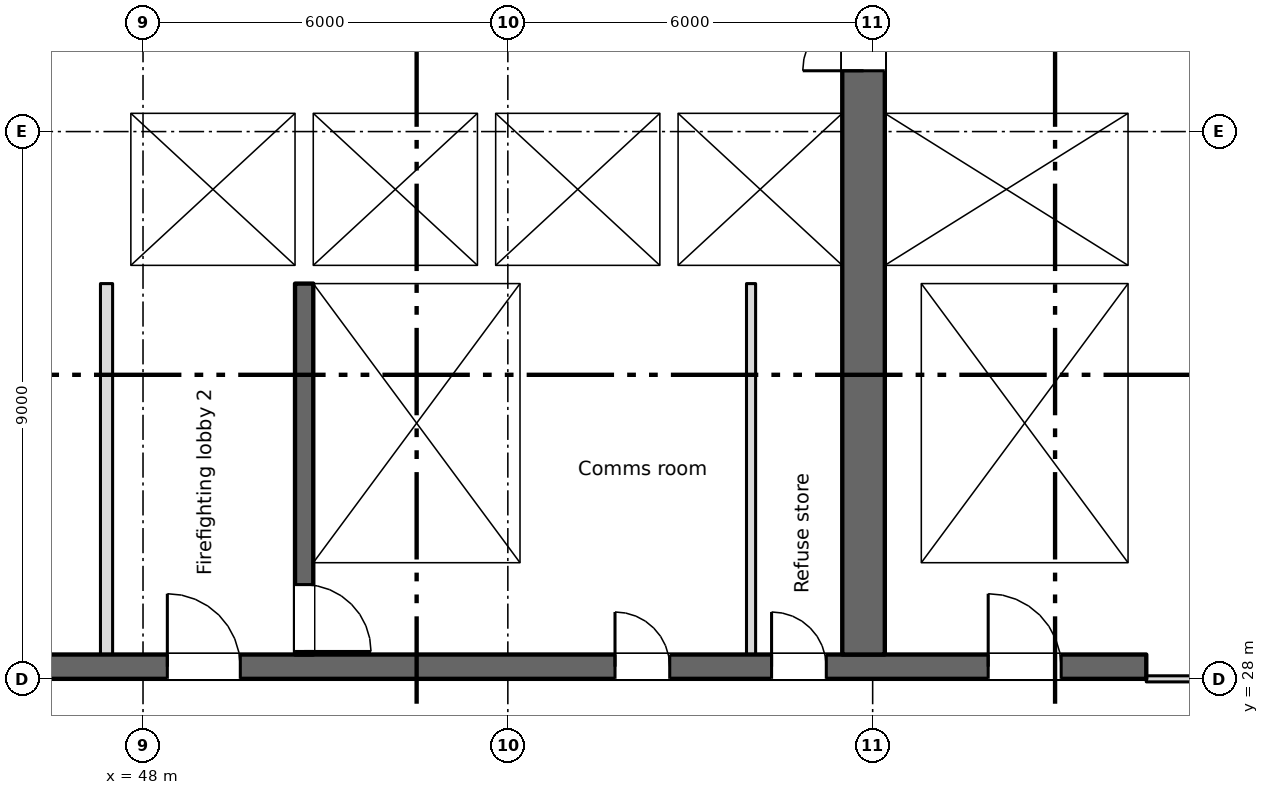
"""IFC4 building model, lengths in metres.
Left out: names, types, materials, properties, quantities, classifications, styles, units other than length and angle.
Written with IfcOpenShell. Run it as: python <this file> out.ifc"""

import sys

from ifc_helpers import new_model, si_unit, direction, frame, frame_2d, origin, place, context, subcontext, project, spatial, rectangle, extrude, element, fill, save


model = new_model("IFC4")
c1 = context("Model", 3, precision=1e-05, world=origin(), true_north=direction((0.0, 1.0)))
c2 = subcontext(c1, "Body", "Model", "MODEL_VIEW")
j1 = project(units=[si_unit("LENGTHUNIT", "METRE"), si_unit("PLANEANGLEUNIT", "RADIAN")], contexts=[c1])
p1 = place(None, origin())
s1 = spatial("IfcSite", under=j1, at=p1, CompositionType="ELEMENT")
p2 = place(p1, origin())
s2 = spatial("IfcBuilding", under=s1, at=p2, CompositionType="ELEMENT")
p3 = place(p2, frame((0.0, 0.0, 223.0)))
s3 = spatial("IfcBuildingStorey", under=s2, at=p3, CompositionType="ELEMENT", Elevation=223.0)
p4 = place(p3, frame((6.6, 28.2, 0.0), z_axis=(0.0, 0.0, 1.0), x_axis=(1.0, 0.0, 0.0)))
e1 = element("IfcWall", 1, at=p4, inside=s3, PredefinedType="SHEAR", context=c2, shape_type="SweptSolid", body=[
    extrude(rectangle(XDim=57.9, YDim=0.4, at=frame_2d((28.95, 0.0))), origin(), (0.0, 0.0, 1.0), 3.15),
])
p5 = place(p4, frame((12.163, 0.0, 0.0)))
e2 = element("IfcOpeningElement", 2, at=p5, cuts=e1, PredefinedType="OPENING", context=c2, shape_type="SweptSolid", body=[
    extrude(rectangle(XDim=0.9, YDim=2.1, at=frame_2d((0.45, 1.05))), frame((0.0, 0.21, 0.0), z_axis=(0.0, -1.0, 0.0), x_axis=(1.0, 0.0, 0.0)), (0.0, 0.0, 1.0), 0.42),
])
p6 = place(p4, frame((14.738, 0.0, 0.0)))
e3 = element("IfcOpeningElement", 3, at=p6, cuts=e1, PredefinedType="OPENING", context=c2, shape_type="SweptSolid", body=[
    extrude(rectangle(XDim=0.9, YDim=2.1, at=frame_2d((0.45, 1.05))), frame((0.0, 0.21, 0.0), z_axis=(0.0, -1.0, 0.0), x_axis=(1.0, 0.0, 0.0)), (0.0, 0.0, 1.0), 0.42),
])
p7 = place(p4, frame((49.163, 0.0, 0.0)))
e4 = element("IfcOpeningElement", 4, at=p7, cuts=e1, PredefinedType="OPENING", context=c2, shape_type="SweptSolid", body=[
    extrude(rectangle(XDim=0.9, YDim=2.1, at=frame_2d((0.45, 1.05))), frame((0.0, 0.21, 0.0), z_axis=(0.0, -1.0, 0.0), x_axis=(1.0, 0.0, 0.0)), (0.0, 0.0, 1.0), 0.42),
])
p8 = place(p4, frame((51.738, 0.0, 0.0)))
e5 = element("IfcOpeningElement", 5, at=p8, cuts=e1, PredefinedType="OPENING", context=c2, shape_type="SweptSolid", body=[
    extrude(rectangle(XDim=0.9, YDim=2.1, at=frame_2d((0.45, 1.05))), frame((0.0, 0.21, 0.0), z_axis=(0.0, -1.0, 0.0), x_axis=(1.0, 0.0, 0.0)), (0.0, 0.0, 1.0), 0.42),
])
p9 = place(p4, frame((1.45, 0.0, 0.0)))
e6 = element("IfcOpeningElement", 6, at=p9, cuts=e1, PredefinedType="OPENING", context=c2, shape_type="SweptSolid", body=[
    extrude(rectangle(XDim=0.9, YDim=2.1, at=frame_2d((0.45, 1.05))), frame((0.0, 0.21, 0.0), z_axis=(0.0, -1.0, 0.0), x_axis=(1.0, 0.0, 0.0)), (0.0, 0.0, 1.0), 0.42),
])
p10 = place(p4, frame((4.8, 0.0, 0.0)))
e7 = element("IfcOpeningElement", 7, at=p10, cuts=e1, PredefinedType="OPENING", context=c2, shape_type="SweptSolid", body=[
    extrude(rectangle(XDim=1.2, YDim=2.1, at=frame_2d((0.6, 1.05))), frame((0.0, 0.21, 0.0), z_axis=(0.0, -1.0, 0.0), x_axis=(1.0, 0.0, 0.0)), (0.0, 0.0, 1.0), 0.42),
])
p11 = place(p4, frame((31.8, 0.0, 0.0)))
e8 = element("IfcOpeningElement", 8, at=p11, cuts=e1, PredefinedType="OPENING", context=c2, shape_type="SweptSolid", body=[
    extrude(rectangle(XDim=1.2, YDim=2.1, at=frame_2d((0.6, 1.05))), frame((0.0, 0.21, 0.0), z_axis=(0.0, -1.0, 0.0), x_axis=(1.0, 0.0, 0.0)), (0.0, 0.0, 1.0), 0.42),
])
p12 = place(p4, frame((55.3, 0.0, 0.0)))
e9 = element("IfcOpeningElement", 9, at=p12, cuts=e1, PredefinedType="OPENING", context=c2, shape_type="SweptSolid", body=[
    extrude(rectangle(XDim=1.2, YDim=2.1, at=frame_2d((0.6, 1.05))), frame((0.0, 0.21, 0.0), z_axis=(0.0, -1.0, 0.0), x_axis=(1.0, 0.0, 0.0)), (0.0, 0.0, 1.0), 0.42),
])
p13 = place(p4, frame((21.8, 0.0, 0.0)))
e10 = element("IfcOpeningElement", 10, at=p13, cuts=e1, PredefinedType="OPENING", context=c2, shape_type="SweptSolid", body=[
    extrude(rectangle(XDim=1.2, YDim=2.1, at=frame_2d((0.6, 1.05))), frame((0.0, 0.21, 0.0), z_axis=(0.0, -1.0, 0.0), x_axis=(1.0, 0.0, 0.0)), (0.0, 0.0, 1.0), 0.42),
])
p14 = place(p4, frame((41.8, 0.0, 0.0)))
e11 = element("IfcOpeningElement", 11, at=p14, cuts=e1, PredefinedType="OPENING", context=c2, shape_type="SweptSolid", body=[
    extrude(rectangle(XDim=1.2, YDim=2.1, at=frame_2d((0.6, 1.05))), frame((0.0, 0.21, 0.0), z_axis=(0.0, -1.0, 0.0), x_axis=(1.0, 0.0, 0.0)), (0.0, 0.0, 1.0), 0.42),
])
p15 = place(p4, frame((24.95, 0.0, 0.0)))
e12 = element("IfcOpeningElement", 12, at=p15, cuts=e1, PredefinedType="OPENING", context=c2, shape_type="SweptSolid", body=[
    extrude(rectangle(XDim=2.4, YDim=2.1, at=frame_2d((1.2, 1.05))), frame((0.0, 0.21, 0.0), z_axis=(0.0, -1.0, 0.0), x_axis=(1.0, 0.0, 0.0)), (0.0, 0.0, 1.0), 0.42),
])
p16 = place(p4, frame((37.45, 0.0, 0.0)))
e13 = element("IfcOpeningElement", 13, at=p16, cuts=e1, PredefinedType="OPENING", context=c2, shape_type="SweptSolid", body=[
    extrude(rectangle(XDim=2.4, YDim=2.1, at=frame_2d((1.2, 1.05))), frame((0.0, 0.21, 0.0), z_axis=(0.0, -1.0, 0.0), x_axis=(1.0, 0.0, 0.0)), (0.0, 0.0, 1.0), 0.42),
])
p17 = place(p4, frame((8.1, 0.0, 0.0)))
e14 = element("IfcOpeningElement", 14, at=p17, cuts=e1, PredefinedType="OPENING", context=c2, shape_type="SweptSolid", body=[
    extrude(rectangle(XDim=2.4, YDim=2.1, at=frame_2d((1.2, 1.05))), frame((0.0, 0.21, 0.0), z_axis=(0.0, -1.0, 0.0), x_axis=(1.0, 0.0, 0.0)), (0.0, 0.0, 1.0), 0.42),
])
p18 = place(p4, frame((28.95, 0.0, 0.0)))
e15 = element("IfcOpeningElement", 15, at=p18, cuts=e1, PredefinedType="OPENING", context=c2, shape_type="SweptSolid", body=[
    extrude(rectangle(XDim=0.9, YDim=2.1, at=frame_2d((0.45, 1.05))), frame((0.0, 0.21, 0.0), z_axis=(0.0, -1.0, 0.0), x_axis=(1.0, 0.0, 0.0)), (0.0, 0.0, 1.0), 0.42),
])
p19 = place(p4, frame((34.95, 0.0, 0.0)))
e16 = element("IfcOpeningElement", 16, at=p19, cuts=e1, PredefinedType="OPENING", context=c2, shape_type="SweptSolid", body=[
    extrude(rectangle(XDim=0.9, YDim=2.1, at=frame_2d((0.45, 1.05))), frame((0.0, 0.21, 0.0), z_axis=(0.0, -1.0, 0.0), x_axis=(1.0, 0.0, 0.0)), (0.0, 0.0, 1.0), 0.42),
])
p20 = place(p3, frame((64.35, 34.8, 0.0), z_axis=(0.0, 0.0, 1.0), x_axis=(0.0, 1.0, 0.0)))
e17 = element("IfcWall", 17, at=p20, inside=s3, PredefinedType="SHEAR", context=c2, shape_type="SweptSolid", body=[
    extrude(rectangle(XDim=10.5, YDim=0.3, at=frame_2d((5.25, 0.0))), origin(), (0.0, 0.0, 1.0), 3.15),
])
p21 = place(p3, frame((59.85, 28.4, 0.0), z_axis=(0.0, 0.0, 1.0), x_axis=(0.0, 1.0, 0.0)))
e18 = element("IfcWall", 18, at=p21, inside=s3, PredefinedType="SHEAR", context=c2, shape_type="SweptSolid", body=[
    extrude(rectangle(XDim=16.9, YDim=0.7, at=frame_2d((8.45, 0.0))), origin(), (0.0, 0.0, 1.0), 3.15),
])
p22 = place(p21, frame((9.6, 0.0, 0.0)))
e19 = element("IfcOpeningElement", 19, at=p22, cuts=e18, PredefinedType="OPENING", context=c2, shape_type="SweptSolid", body=[
    extrude(rectangle(XDim=2.0, YDim=2.1, at=frame_2d((1.0, 1.05))), frame((0.0, 0.36, 0.0), z_axis=(0.0, -1.0, 0.0), x_axis=(1.0, 0.0, 0.0)), (0.0, 0.0, 1.0), 0.72),
])
p23 = place(p21, frame((15.4, 0.0, 0.0)))
e20 = element("IfcOpeningElement", 20, at=p23, cuts=e18, PredefinedType="OPENING", context=c2, shape_type="SweptSolid", body=[
    extrude(rectangle(XDim=1.2, YDim=2.1, at=frame_2d((0.6, 1.05))), frame((0.0, 0.36, 0.0), z_axis=(0.0, -1.0, 0.0), x_axis=(1.0, 0.0, 0.0)), (0.0, 0.0, 1.0), 0.72),
])
p24 = place(p3, frame((50.65, 34.5, 0.0), z_axis=(0.0, 0.0, 1.0), x_axis=(0.0, -1.0, 0.0)))
e21 = element("IfcWall", 21, at=p24, inside=s3, PredefinedType="SHEAR", context=c2, shape_type="SweptSolid", body=[
    extrude(rectangle(XDim=6.1, YDim=0.3, at=frame_2d((3.05, 0.0))), origin(), (0.0, 0.0, 1.0), 3.15),
])
p25 = place(p24, frame((4.95, 0.0, 0.0)))
e22 = element("IfcOpeningElement", 22, at=p25, cuts=e21, PredefinedType="OPENING", context=c2, shape_type="SweptSolid", body=[
    extrude(rectangle(XDim=1.1, YDim=2.1, at=frame_2d((0.55, 1.05))), frame((0.0, 0.16, 0.0), z_axis=(0.0, -1.0, 0.0), x_axis=(1.0, 0.0, 0.0)), (0.0, 0.0, 1.0), 0.32),
])
p26 = place(p3, frame((54.35, 28.4, 0.0), z_axis=(0.0, 0.0, 1.0), x_axis=(0.0, 1.0, 0.0)))
e23 = element("IfcWall", 23, at=p26, inside=s3, PredefinedType="SHEAR", context=c2, shape_type="SweptSolid", body=[
    extrude(rectangle(XDim=6.1, YDim=0.3, at=frame_2d((3.05, 0.0))), origin(), (0.0, 0.0, 1.0), 3.15),
])
p27 = place(p3, frame((60.5, 28.4, 0.0), z_axis=(0.0, 0.0, 1.0), x_axis=(0.0, 1.0, 0.0)))
e24 = element("IfcWall", 24, at=p27, inside=s3, PredefinedType="SHEAR", context=c2, shape_type="SweptSolid", body=[
    extrude(rectangle(XDim=6.1, YDim=0.6, at=frame_2d((3.05, 0.0))), origin(), (0.0, 0.0, 1.0), 3.15),
])
p28 = place(p3, frame((64.35, 28.4, 0.0), z_axis=(0.0, 0.0, 1.0), x_axis=(0.0, 1.0, 0.0)))
e25 = element("IfcWall", 25, at=p28, inside=s3, PredefinedType="SHEAR", context=c2, shape_type="SweptSolid", body=[
    extrude(rectangle(XDim=6.1, YDim=0.3, at=frame_2d((3.05, 0.0))), origin(), (0.0, 0.0, 1.0), 3.15),
])
p29 = place(p3, frame((47.3, 34.65, 0.0), z_axis=(0.0, 0.0, 1.0), x_axis=(1.0, 0.0, 0.0)))
e26 = element("IfcWall", 26, at=p29, inside=s3, PredefinedType="SHEAR", context=c2, shape_type="SweptSolid", body=[
    extrude(rectangle(XDim=12.2, YDim=0.3, at=frame_2d((6.1, 0.0))), origin(), (0.0, 0.0, 1.0), 3.15),
])
p30 = place(p29, frame((1.3, 0.0, 0.0)))
e27 = element("IfcOpeningElement", 27, at=p30, cuts=e26, PredefinedType="OPENING", context=c2, shape_type="SweptSolid", body=[
    extrude(rectangle(XDim=1.1, YDim=2.1, at=frame_2d((0.55, 1.05))), frame((0.0, 0.16, 0.0), z_axis=(0.0, -1.0, 0.0), x_axis=(1.0, 0.0, 0.0)), (0.0, 0.0, 1.0), 0.32),
])
p31 = place(p3, frame((60.2, 34.65, 0.0), z_axis=(0.0, 0.0, 1.0), x_axis=(1.0, 0.0, 0.0)))
e28 = element("IfcWall", 28, at=p31, inside=s3, PredefinedType="SHEAR", context=c2, shape_type="SweptSolid", body=[
    extrude(rectangle(XDim=4.3, YDim=0.3, at=frame_2d((2.15, 0.0))), origin(), (0.0, 0.0, 1.0), 3.15),
])
p32 = place(p3, frame((47.3, 37.45, 0.0), z_axis=(0.0, 0.0, 1.0), x_axis=(1.0, 0.0, 0.0)))
e29 = element("IfcWall", 29, at=p32, inside=s3, PredefinedType="SHEAR", context=c2, shape_type="SweptSolid", body=[
    extrude(rectangle(XDim=12.2, YDim=0.3, at=frame_2d((6.1, 0.0))), origin(), (0.0, 0.0, 1.0), 3.15),
])
p33 = place(p32, frame((4.3, 0.0, 0.0)))
e30 = element("IfcOpeningElement", 30, at=p33, cuts=e29, PredefinedType="OPENING", context=c2, shape_type="SweptSolid", body=[
    extrude(rectangle(XDim=1.1, YDim=2.1, at=frame_2d((0.55, 1.05))), frame((0.0, 0.16, 0.0), z_axis=(0.0, -1.0, 0.0), x_axis=(1.0, 0.0, 0.0)), (0.0, 0.0, 1.0), 0.32),
])
p34 = place(p32, frame((7.3, 0.0, 0.0)))
e31 = element("IfcOpeningElement", 31, at=p34, cuts=e29, PredefinedType="OPENING", context=c2, shape_type="SweptSolid", body=[
    extrude(rectangle(XDim=1.1, YDim=2.1, at=frame_2d((0.55, 1.05))), frame((0.0, 0.16, 0.0), z_axis=(0.0, -1.0, 0.0), x_axis=(1.0, 0.0, 0.0)), (0.0, 0.0, 1.0), 0.32),
])
p35 = place(p32, frame((10.3, 0.0, 0.0)))
e32 = element("IfcOpeningElement", 32, at=p35, cuts=e29, PredefinedType="OPENING", context=c2, shape_type="SweptSolid", body=[
    extrude(rectangle(XDim=1.1, YDim=2.1, at=frame_2d((0.55, 1.05))), frame((0.0, 0.16, 0.0), z_axis=(0.0, -1.0, 0.0), x_axis=(1.0, 0.0, 0.0)), (0.0, 0.0, 1.0), 0.32),
])
p36 = place(p3, frame((60.2, 37.45, 0.0), z_axis=(0.0, 0.0, 1.0), x_axis=(1.0, 0.0, 0.0)))
e33 = element("IfcWall", 33, at=p36, inside=s3, PredefinedType="SHEAR", context=c2, shape_type="SweptSolid", body=[
    extrude(rectangle(XDim=4.0, YDim=0.3, at=frame_2d((2.0, 0.0))), origin(), (0.0, 0.0, 1.0), 3.15),
])
p37 = place(p36, frame((1.45, 0.0, 0.0)))
e34 = element("IfcOpeningElement", 34, at=p37, cuts=e33, PredefinedType="OPENING", context=c2, shape_type="SweptSolid", body=[
    extrude(rectangle(XDim=1.1, YDim=2.1, at=frame_2d((0.55, 1.05))), frame((0.0, 0.16, 0.0), z_axis=(0.0, -1.0, 0.0), x_axis=(1.0, 0.0, 0.0)), (0.0, 0.0, 1.0), 0.32),
])
p38 = place(p3, frame((47.55, 34.8, 0.0), z_axis=(0.0, 0.0, 1.0), x_axis=(0.0, 1.0, 0.0)))
e35 = element("IfcWall", 35, at=p38, inside=s3, PredefinedType="SHEAR", context=c2, shape_type="SweptSolid", body=[
    extrude(rectangle(XDim=2.5, YDim=0.5, at=frame_2d((1.25, 0.0))), origin(), (0.0, 0.0, 1.0), 3.15),
])
for number, where, z_axis, x_axis in (
    (36, (50.65, 34.8, 0.0), (0.0, 0.0, 1.0), (0.0, 1.0, 0.0)),
    (37, (53.65, 34.8, 0.0), (0.0, 0.0, 1.0), (0.0, 1.0, 0.0)),
    (38, (56.65, 34.8, 0.0), (0.0, 0.0, 1.0), (0.0, 1.0, 0.0)),
):
    element("IfcWall", number, at=place(p3, frame(where, z_axis=z_axis, x_axis=x_axis)), inside=s3, PredefinedType="SHEAR", context=c2, shape_type="SweptSolid", body=[
        extrude(rectangle(XDim=2.5, YDim=0.3, at=frame_2d((1.25, 0.0))), origin(), (0.0, 0.0, 1.0), 3.15),
    ])
p39 = place(p3, frame((47.4, 28.4, 0.0), z_axis=(0.0, 0.0, 1.0), x_axis=(0.0, 1.0, 0.0)))
e39 = element("IfcWall", 39, at=p39, inside=s3, PredefinedType="PARTITIONING", context=c2, shape_type="SweptSolid", body=[
    extrude(rectangle(XDim=6.1, YDim=0.2, at=frame_2d((3.05, 0.0))), origin(), (0.0, 0.0, 1.0), 3.15),
])
p40 = place(p3, frame((58.0, 28.4, 0.0), z_axis=(0.0, 0.0, 1.0), x_axis=(0.0, 1.0, 0.0)))
e40 = element("IfcWall", 40, at=p40, inside=s3, PredefinedType="PARTITIONING", context=c2, shape_type="SweptSolid", body=[
    extrude(rectangle(XDim=6.1, YDim=0.15, at=frame_2d((3.05, 0.0))), origin(), (0.0, 0.0, 1.0), 3.15),
])
p41 = place(p3, frame((64.5, 28.0, 0.0), z_axis=(0.0, 0.0, 1.0), x_axis=(1.0, 0.0, 0.0)))
e41 = element("IfcWall", 41, at=p41, inside=s3, PredefinedType="PARTITIONING", context=c2, shape_type="SweptSolid", body=[
    extrude(rectangle(XDim=6.9, YDim=0.1, at=frame_2d((3.45, 0.0))), origin(), (0.0, 0.0, 1.0), 3.15),
])
p42 = place(p41, frame((2.55, 0.0, 0.0)))
e42 = element("IfcOpeningElement", 42, at=p42, cuts=e41, PredefinedType="OPENING", context=c2, shape_type="SweptSolid", body=[
    extrude(rectangle(XDim=1.8, YDim=2.1, at=frame_2d((0.9, 1.05))), frame((0.0, 0.06, 0.0), z_axis=(0.0, -1.0, 0.0), x_axis=(1.0, 0.0, 0.0)), (0.0, 0.0, 1.0), 0.12),
])
p43 = place(p7, origin())
e43 = element("IfcDoor", 43, at=p43, inside=s3, OperationType="SINGLE_SWING_LEFT", PredefinedType="DOOR", context=c2, shape_type="SweptSolid", body=[
    extrude(rectangle(XDim=0.9, YDim=2.1, at=frame_2d((0.45, 1.05))), frame((0.0, 0.025, 0.0), z_axis=(0.0, -1.0, 0.0), x_axis=(1.0, 0.0, 0.0)), (0.0, 0.0, 1.0), 0.05),
])
fill(e4, e43)
p44 = place(p8, origin())
e44 = element("IfcDoor", 44, at=p44, inside=s3, OperationType="SINGLE_SWING_LEFT", PredefinedType="DOOR", context=c2, shape_type="SweptSolid", body=[
    extrude(rectangle(XDim=0.9, YDim=2.1, at=frame_2d((0.45, 1.05))), frame((0.0, 0.025, 0.0), z_axis=(0.0, -1.0, 0.0), x_axis=(1.0, 0.0, 0.0)), (0.0, 0.0, 1.0), 0.05),
])
fill(e5, e44)
p45 = place(p33, origin())
e45 = element("IfcDoor", 45, at=p45, inside=s3, OperationType="SLIDING_TO_LEFT", PredefinedType="DOOR", context=c2, shape_type="SweptSolid", body=[
    extrude(rectangle(XDim=1.1, YDim=2.1, at=frame_2d((0.55, 1.05))), frame((0.0, 0.025, 0.0), z_axis=(0.0, -1.0, 0.0), x_axis=(1.0, 0.0, 0.0)), (0.0, 0.0, 1.0), 0.05),
])
fill(e30, e45)
p46 = place(p34, origin())
e46 = element("IfcDoor", 46, at=p46, inside=s3, OperationType="SLIDING_TO_LEFT", PredefinedType="DOOR", context=c2, shape_type="SweptSolid", body=[
    extrude(rectangle(XDim=1.1, YDim=2.1, at=frame_2d((0.55, 1.05))), frame((0.0, 0.025, 0.0), z_axis=(0.0, -1.0, 0.0), x_axis=(1.0, 0.0, 0.0)), (0.0, 0.0, 1.0), 0.05),
])
fill(e31, e46)
p47 = place(p35, origin())
e47 = element("IfcDoor", 47, at=p47, inside=s3, OperationType="SLIDING_TO_LEFT", PredefinedType="DOOR", context=c2, shape_type="SweptSolid", body=[
    extrude(rectangle(XDim=1.1, YDim=2.1, at=frame_2d((0.55, 1.05))), frame((0.0, 0.025, 0.0), z_axis=(0.0, -1.0, 0.0), x_axis=(1.0, 0.0, 0.0)), (0.0, 0.0, 1.0), 0.05),
])
fill(e32, e47)
p48 = place(p37, origin())
e48 = element("IfcDoor", 48, at=p48, inside=s3, OperationType="SLIDING_TO_LEFT", PredefinedType="DOOR", context=c2, shape_type="SweptSolid", body=[
    extrude(rectangle(XDim=1.1, YDim=2.1, at=frame_2d((0.55, 1.05))), frame((0.0, 0.025, 0.0), z_axis=(0.0, -1.0, 0.0), x_axis=(1.0, 0.0, 0.0)), (0.0, 0.0, 1.0), 0.05),
])
fill(e34, e48)
p49 = place(p30, origin())
e49 = element("IfcDoor", 49, at=p49, inside=s3, OperationType="SLIDING_TO_LEFT", PredefinedType="DOOR", context=c2, shape_type="SweptSolid", body=[
    extrude(rectangle(XDim=1.1, YDim=2.1, at=frame_2d((0.55, 1.05))), frame((0.0, 0.025, 0.0), z_axis=(0.0, -1.0, 0.0), x_axis=(1.0, 0.0, 0.0)), (0.0, 0.0, 1.0), 0.05),
])
fill(e27, e49)
p50 = place(p25, origin())
e50 = element("IfcDoor", 50, at=p50, inside=s3, OperationType="SINGLE_SWING_RIGHT", PredefinedType="DOOR", context=c2, shape_type="SweptSolid", body=[
    extrude(rectangle(XDim=1.1, YDim=2.1, at=frame_2d((0.55, 1.05))), frame((0.0, 0.025, 0.0), z_axis=(0.0, -1.0, 0.0), x_axis=(1.0, 0.0, 0.0)), (0.0, 0.0, 1.0), 0.05),
])
fill(e22, e50)
p51 = place(p12, origin())
e51 = element("IfcDoor", 51, at=p51, inside=s3, OperationType="SINGLE_SWING_LEFT", PredefinedType="DOOR", context=c2, shape_type="SweptSolid", body=[
    extrude(rectangle(XDim=1.2, YDim=2.1, at=frame_2d((0.6, 1.05))), frame((0.0, 0.025, 0.0), z_axis=(0.0, -1.0, 0.0), x_axis=(1.0, 0.0, 0.0)), (0.0, 0.0, 1.0), 0.05),
])
fill(e9, e51)
p52 = place(p14, origin())
e52 = element("IfcDoor", 52, at=p52, inside=s3, OperationType="SINGLE_SWING_LEFT", PredefinedType="DOOR", context=c2, shape_type="SweptSolid", body=[
    extrude(rectangle(XDim=1.2, YDim=2.1, at=frame_2d((0.6, 1.05))), frame((0.0, 0.025, 0.0), z_axis=(0.0, -1.0, 0.0), x_axis=(1.0, 0.0, 0.0)), (0.0, 0.0, 1.0), 0.05),
])
fill(e11, e52)
p53 = place(p22, origin())
e53 = element("IfcDoor", 53, at=p53, inside=s3, OperationType="DOUBLE_DOOR_SINGLE_SWING", PredefinedType="DOOR", context=c2, shape_type="SweptSolid", body=[
    extrude(rectangle(XDim=2.0, YDim=2.1, at=frame_2d((1.0, 1.05))), frame((0.0, 0.025, 0.0), z_axis=(0.0, -1.0, 0.0), x_axis=(1.0, 0.0, 0.0)), (0.0, 0.0, 1.0), 0.05),
])
fill(e19, e53)
save(model, sys.argv[1])
